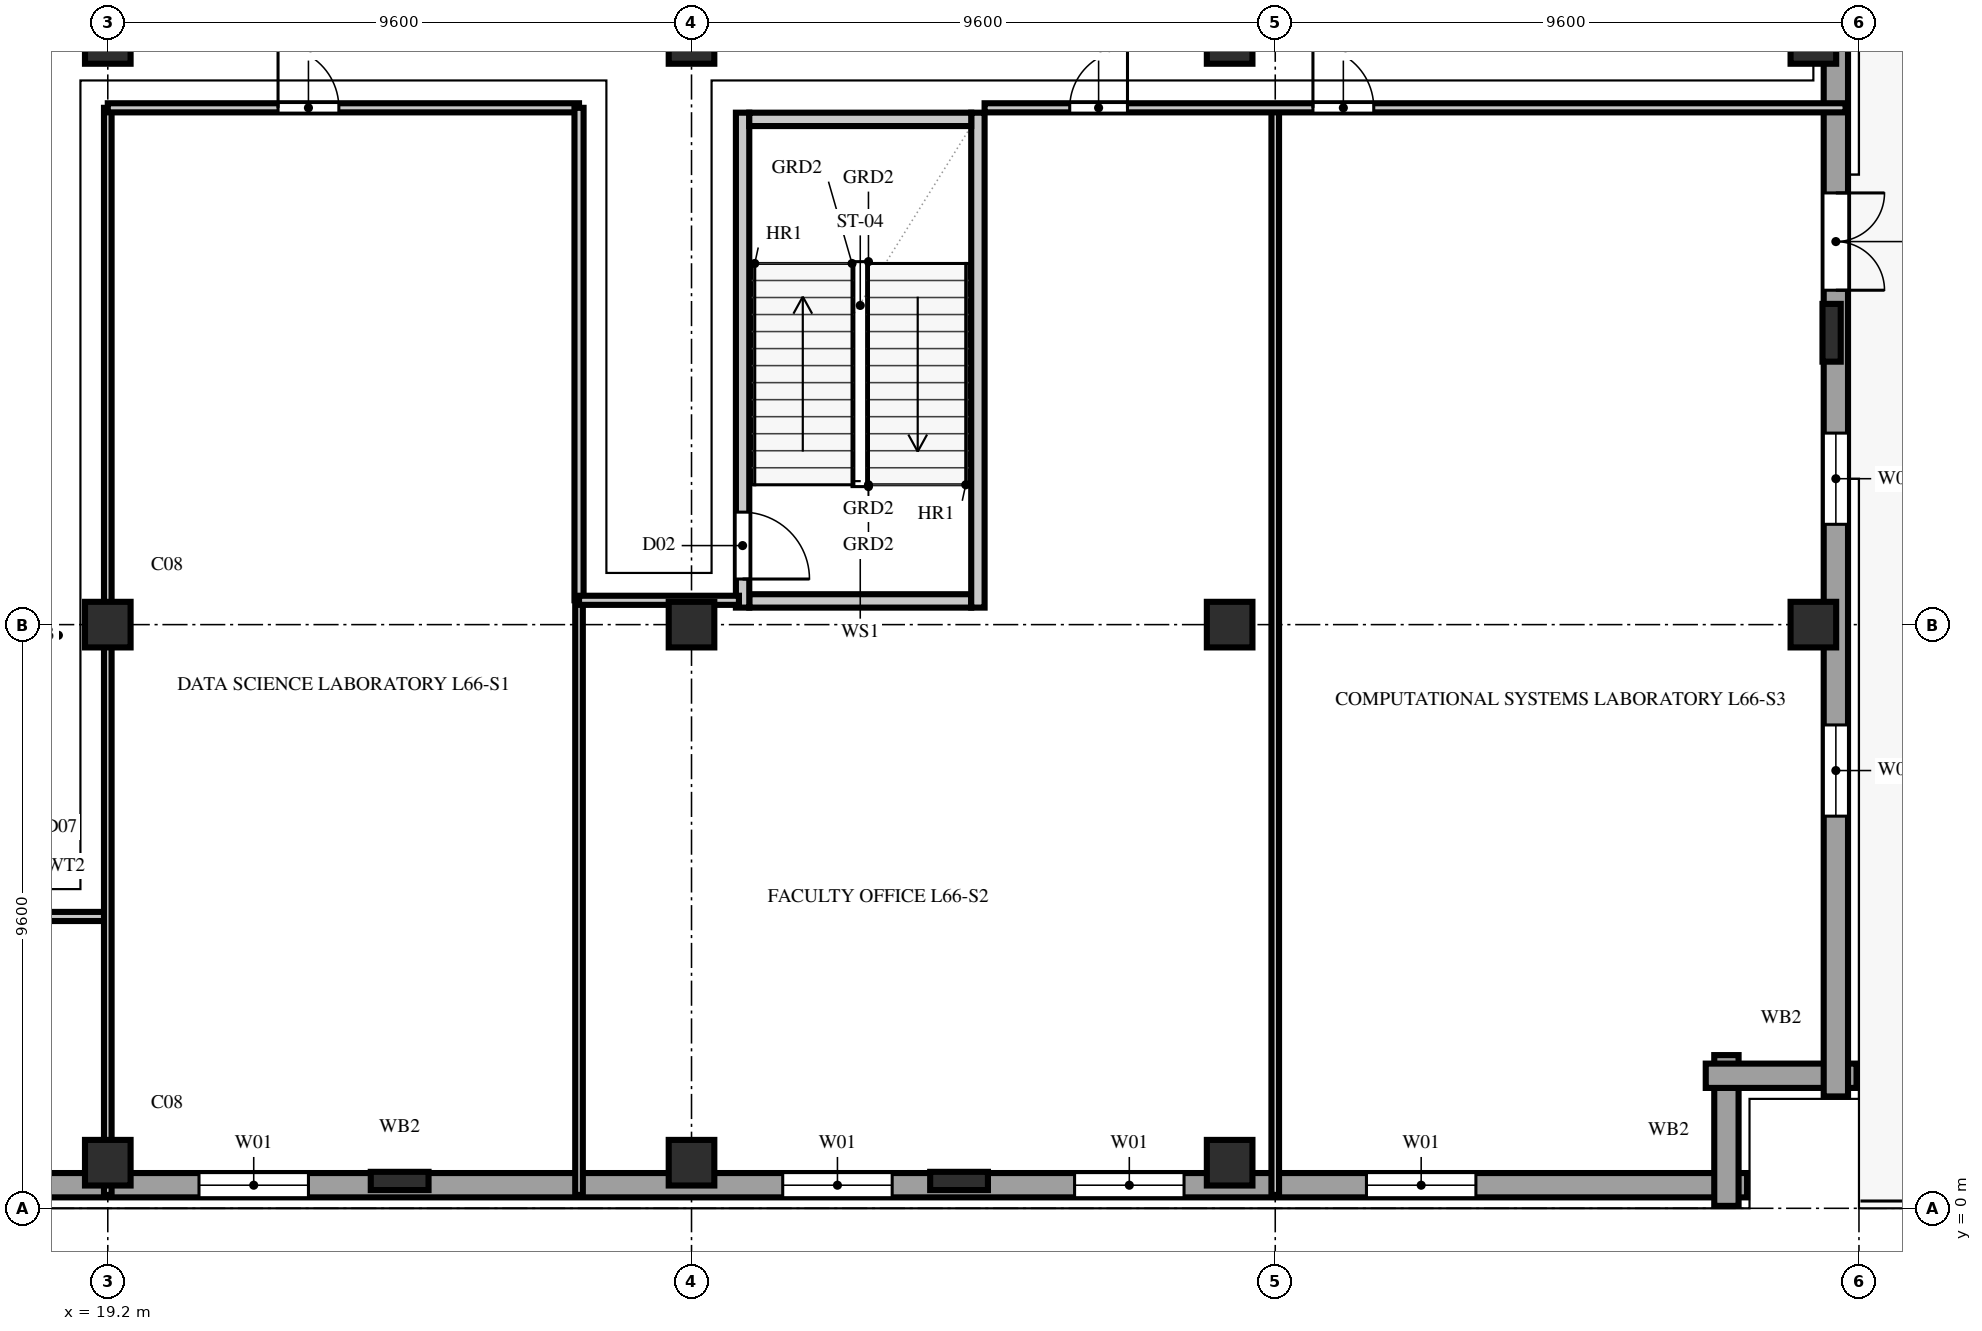
"""IFC4 building model, lengths in metres.
Left out: names, types, materials, properties, quantities, classifications, styles, units other than length and angle.
Written with IfcOpenShell. Run it as: python <this file> out.ifc"""

import sys

from ifc_helpers import new_model, si_unit, direction, frame, frame_2d, origin, origin_2d, place, context, subcontext, project, spatial, rectangle, extrude, element, fill, save


model = new_model("IFC4")
c1 = context("Model", 3, precision=1e-05, world=origin(), true_north=direction((0.0, 1.0)))
c2 = subcontext(c1, "Body", "Model", "MODEL_VIEW")
j1 = project(units=[si_unit("LENGTHUNIT", "METRE"), si_unit("PLANEANGLEUNIT", "RADIAN")], contexts=[c1])
p1 = place(None, origin())
s1 = spatial("IfcSite", under=j1, at=p1, CompositionType="ELEMENT")
p2 = place(p1, origin())
s2 = spatial("IfcBuilding", under=s1, at=p2, CompositionType="ELEMENT")
p3 = place(p2, frame((0.0, 0.0, 261.0)))
s3 = spatial("IfcBuildingStorey", under=s2, at=p3, CompositionType="ELEMENT", Elevation=261.0)
for number, where, z_axis, x_axis in (
    (1, (19.2, 0.75, 0.0), (0.0, 0.0, 1.0), (1.0, 0.0, 0.0)),
    (2, (19.2, 9.6, 0.0), (0.0, 0.0, 1.0), (1.0, 0.0, 0.0)),
    (3, (19.2, 19.2, 0.0), (0.0, 0.0, 1.0), (1.0, 0.0, 0.0)),
    (4, (28.8, 0.75, 0.0), (0.0, 0.0, 1.0), (1.0, 0.0, 0.0)),
    (5, (28.8, 9.6, 0.0), (0.0, 0.0, 1.0), (1.0, 0.0, 0.0)),
    (6, (28.8, 19.2, 0.0), (0.0, 0.0, 1.0), (1.0, 0.0, 0.0)),
    (7, (37.65, 0.75, 0.0), (0.0, 0.0, 1.0), (1.0, 0.0, 0.0)),
    (8, (37.65, 9.6, 0.0), (0.0, 0.0, 1.0), (1.0, 0.0, 0.0)),
    (9, (37.65, 19.2, 0.0), (0.0, 0.0, 1.0), (1.0, 0.0, 0.0)),
    (10, (47.25, 9.6, 0.0), (0.0, 0.0, 1.0), (1.0, 0.0, 0.0)),
    (11, (47.25, 19.2, 0.0), (0.0, 0.0, 1.0), (1.0, 0.0, 0.0)),
):
    element("IfcColumn", number, at=place(p3, frame(where, z_axis=z_axis, x_axis=x_axis)), inside=s3, PredefinedType="COLUMN", context=c2, shape_type="SweptSolid", body=[
        extrude(rectangle(XDim=0.75, YDim=0.75, at=origin_2d()), origin(), (0.0, 0.0, 1.0), 4.8),
    ])
for number, where, z_axis, x_axis in (
    (12, (24.0, 0.45, 0.0), (0.0, 0.0, 1.0), (1.0, 0.0, 0.0)),
    (13, (33.2, 0.45, 0.0), (0.0, 0.0, 1.0), (1.0, 0.0, 0.0)),
    (14, (47.55, 14.4, 0.0), (0.0, 0.0, 1.0), (0.0, 1.0, 0.0)),
):
    element("IfcColumn", number, at=place(p3, frame(where, z_axis=z_axis, x_axis=x_axis)), inside=s3, PredefinedType="PILASTER", context=c2, shape_type="SweptSolid", body=[
        extrude(rectangle(XDim=0.95, YDim=0.3, at=origin_2d()), origin(), (0.0, 0.0, 1.0), 4.8),
    ])
p4 = place(p3, frame((1.84, 0.38, 0.0), z_axis=(0.0, 0.0, 1.0), x_axis=(1.0, 0.0, 0.0)))
e15 = element("IfcWall", 15, at=p4, inside=s3, PredefinedType="SOLIDWALL", context=c2, shape_type="SweptSolid", body=[
    extrude(rectangle(XDim=44.32, YDim=0.4, at=frame_2d((22.16, 0.0))), origin(), (0.0, 0.0, 1.0), 4.54),
])
p5 = place(p4, frame((4.46, 0.0, 0.85)))
e16 = element("IfcOpeningElement", 16, at=p5, cuts=e15, PredefinedType="OPENING", context=c2, shape_type="SweptSolid", body=[
    extrude(rectangle(XDim=1.8, YDim=1.85, at=frame_2d((0.9, 0.925))), frame((0.0, 0.212, 0.0), z_axis=(0.0, -1.0, 0.0), x_axis=(1.0, 0.0, 0.0)), (0.0, 0.0, 1.0), 0.424),
])
p6 = place(p4, frame((9.26, 0.0, 0.85)))
e17 = element("IfcOpeningElement", 17, at=p6, cuts=e15, PredefinedType="OPENING", context=c2, shape_type="SweptSolid", body=[
    extrude(rectangle(XDim=1.8, YDim=1.85, at=frame_2d((0.9, 0.925))), frame((0.0, 0.212, 0.0), z_axis=(0.0, -1.0, 0.0), x_axis=(1.0, 0.0, 0.0)), (0.0, 0.0, 1.0), 0.424),
])
p7 = place(p4, frame((18.86, 0.0, 0.85)))
e18 = element("IfcOpeningElement", 18, at=p7, cuts=e15, PredefinedType="OPENING", context=c2, shape_type="SweptSolid", body=[
    extrude(rectangle(XDim=1.8, YDim=1.85, at=frame_2d((0.9, 0.925))), frame((0.0, 0.212, 0.0), z_axis=(0.0, -1.0, 0.0), x_axis=(1.0, 0.0, 0.0)), (0.0, 0.0, 1.0), 0.424),
])
p8 = place(p4, frame((28.46, 0.0, 0.85)))
e19 = element("IfcOpeningElement", 19, at=p8, cuts=e15, PredefinedType="OPENING", context=c2, shape_type="SweptSolid", body=[
    extrude(rectangle(XDim=1.8, YDim=1.85, at=frame_2d((0.9, 0.925))), frame((0.0, 0.212, 0.0), z_axis=(0.0, -1.0, 0.0), x_axis=(1.0, 0.0, 0.0)), (0.0, 0.0, 1.0), 0.424),
])
p9 = place(p4, frame((33.26, 0.0, 0.85)))
e20 = element("IfcOpeningElement", 20, at=p9, cuts=e15, PredefinedType="OPENING", context=c2, shape_type="SweptSolid", body=[
    extrude(rectangle(XDim=1.8, YDim=1.85, at=frame_2d((0.9, 0.925))), frame((0.0, 0.212, 0.0), z_axis=(0.0, -1.0, 0.0), x_axis=(1.0, 0.0, 0.0)), (0.0, 0.0, 1.0), 0.424),
])
p10 = place(p4, frame((38.06, 0.0, 0.85)))
e21 = element("IfcOpeningElement", 21, at=p10, cuts=e15, PredefinedType="OPENING", context=c2, shape_type="SweptSolid", body=[
    extrude(rectangle(XDim=1.8, YDim=1.85, at=frame_2d((0.9, 0.925))), frame((0.0, 0.212, 0.0), z_axis=(0.0, -1.0, 0.0), x_axis=(1.0, 0.0, 0.0)), (0.0, 0.0, 1.0), 0.424),
])
for number, where, z_axis, x_axis in (
    (22, (45.82, 0.04, 0.0), (0.0, 0.0, 1.0), (0.0, 1.0, 0.0)),
    (23, (45.48, 2.18, 0.0), (0.0, 0.0, 1.0), (1.0, 0.0, 0.0)),
):
    element("IfcWall", number, at=place(p3, frame(where, z_axis=z_axis, x_axis=x_axis)), inside=s3, PredefinedType="SOLIDWALL", context=c2, shape_type="SweptSolid", body=[
        extrude(rectangle(XDim=2.48, YDim=0.4, at=frame_2d((1.24, 0.0))), origin(), (0.0, 0.0, 1.0), 4.54),
    ])
p11 = place(p3, frame((47.62, 1.84, 0.0), z_axis=(0.0, 0.0, 1.0), x_axis=(0.0, 1.0, 0.0)))
e24 = element("IfcWall", 24, at=p11, inside=s3, PredefinedType="SOLIDWALL", context=c2, shape_type="SweptSolid", body=[
    extrude(rectangle(XDim=34.72, YDim=0.4, at=frame_2d((17.36, 0.0))), origin(), (0.0, 0.0, 1.0), 4.54),
])
p12 = place(p11, frame((13.26, 0.0, 0.0)))
e25 = element("IfcOpeningElement", 25, at=p12, cuts=e24, PredefinedType="OPENING", context=c2, shape_type="SweptSolid", body=[
    extrude(rectangle(XDim=1.6, YDim=2.3, at=frame_2d((0.8, 1.15))), frame((0.0, 0.212, 0.0), z_axis=(0.0, -1.0, 0.0), x_axis=(1.0, 0.0, 0.0)), (0.0, 0.0, 1.0), 0.424),
])
p13 = place(p11, frame((4.61, 0.0, 0.85)))
e26 = element("IfcOpeningElement", 26, at=p13, cuts=e24, PredefinedType="OPENING", context=c2, shape_type="SweptSolid", body=[
    extrude(rectangle(XDim=1.5, YDim=1.85, at=frame_2d((0.75, 0.925))), frame((0.0, 0.212, 0.0), z_axis=(0.0, -1.0, 0.0), x_axis=(1.0, 0.0, 0.0)), (0.0, 0.0, 1.0), 0.424),
])
p14 = place(p11, frame((9.41, 0.0, 0.85)))
e27 = element("IfcOpeningElement", 27, at=p14, cuts=e24, PredefinedType="OPENING", context=c2, shape_type="SweptSolid", body=[
    extrude(rectangle(XDim=1.5, YDim=1.85, at=frame_2d((0.75, 0.925))), frame((0.0, 0.212, 0.0), z_axis=(0.0, -1.0, 0.0), x_axis=(1.0, 0.0, 0.0)), (0.0, 0.0, 1.0), 0.424),
])
p15 = place(p11, frame((23.81, 0.0, 0.85)))
e28 = element("IfcOpeningElement", 28, at=p15, cuts=e24, PredefinedType="OPENING", context=c2, shape_type="SweptSolid", body=[
    extrude(rectangle(XDim=1.5, YDim=1.85, at=frame_2d((0.75, 0.925))), frame((0.0, 0.212, 0.0), z_axis=(0.0, -1.0, 0.0), x_axis=(1.0, 0.0, 0.0)), (0.0, 0.0, 1.0), 0.424),
])
p16 = place(p11, frame((28.61, 0.0, 0.85)))
e29 = element("IfcOpeningElement", 29, at=p16, cuts=e24, PredefinedType="OPENING", context=c2, shape_type="SweptSolid", body=[
    extrude(rectangle(XDim=1.5, YDim=1.85, at=frame_2d((0.75, 0.925))), frame((0.0, 0.212, 0.0), z_axis=(0.0, -1.0, 0.0), x_axis=(1.0, 0.0, 0.0)), (0.0, 0.0, 1.0), 0.424),
])
p17 = place(p3, frame((29.75, 9.99, 0.0), z_axis=(0.0, 0.0, 1.0), x_axis=(1.0, 0.0, 0.0)))
e30 = element("IfcWall", 30, at=p17, inside=s3, PredefinedType="SOLIDWALL", context=c2, shape_type="SweptSolid", body=[
    extrude(rectangle(XDim=3.65, YDim=0.22, at=frame_2d((1.825, 0.0))), origin(), (0.0, 0.0, 1.0), 4.54),
])
p18 = place(p3, frame((29.64, 9.88, 0.0), z_axis=(0.0, 0.0, 1.0), x_axis=(0.0, 1.0, 0.0)))
e31 = element("IfcWall", 31, at=p18, inside=s3, PredefinedType="SOLIDWALL", context=c2, shape_type="SweptSolid", body=[
    extrude(rectangle(XDim=8.14, YDim=0.22, at=frame_2d((4.07, 0.0))), origin(), (0.0, 0.0, 1.0), 4.54),
])
p19 = place(p18, frame((0.47, 0.0, 0.0)))
e32 = element("IfcOpeningElement", 32, at=p19, cuts=e31, PredefinedType="OPENING", context=c2, shape_type="SweptSolid", body=[
    extrude(rectangle(XDim=1.1, YDim=2.2, at=frame_2d((0.55, 1.1))), frame((0.0, 0.122, 0.0), z_axis=(0.0, -1.0, 0.0), x_axis=(1.0, 0.0, 0.0)), (0.0, 0.0, 1.0), 0.244),
])
p20 = place(p3, frame((33.51, 9.88, 0.0), z_axis=(0.0, 0.0, 1.0), x_axis=(0.0, 1.0, 0.0)))
e33 = element("IfcWall", 33, at=p20, inside=s3, PredefinedType="SOLIDWALL", context=c2, shape_type="SweptSolid", body=[
    extrude(rectangle(XDim=8.14, YDim=0.22, at=frame_2d((4.07, 0.0))), origin(), (0.0, 0.0, 1.0), 4.54),
])
p21 = place(p3, frame((29.75, 17.91, 0.0), z_axis=(0.0, 0.0, 1.0), x_axis=(1.0, 0.0, 0.0)))
e34 = element("IfcWall", 34, at=p21, inside=s3, PredefinedType="SOLIDWALL", context=c2, shape_type="SweptSolid", body=[
    extrude(rectangle(XDim=3.65, YDim=0.22, at=frame_2d((1.825, 0.0))), origin(), (0.0, 0.0, 1.0), 4.54),
])
p22 = place(p3, frame((17.05, 4.8, 0.0), z_axis=(0.0, 0.0, 1.0), x_axis=(1.0, 0.0, 0.0)))
e35 = element("IfcWall", 35, at=p22, inside=s3, PredefinedType="PARTITIONING", context=c2, shape_type="SweptSolid", body=[
    extrude(rectangle(XDim=2.15, YDim=0.15, at=frame_2d((1.075, 0.0))), origin(), (0.0, 0.0, 1.0), 4.54),
])
p23 = place(p3, frame((19.2, 0.22, 0.0), z_axis=(0.0, 0.0, 1.0), x_axis=(0.0, 1.0, 0.0)))
e36 = element("IfcWall", 36, at=p23, inside=s3, PredefinedType="PARTITIONING", context=c2, shape_type="SweptSolid", body=[
    extrude(rectangle(XDim=0.53, YDim=0.125, at=frame_2d((0.265, 0.0))), origin(), (0.0, 0.0, 1.0), 4.54),
])
p24 = place(p3, frame((19.2, 0.75, 0.0), z_axis=(0.0, 0.0, 1.0), x_axis=(0.0, 1.0, 0.0)))
e37 = element("IfcWall", 37, at=p24, inside=s3, PredefinedType="PARTITIONING", context=c2, shape_type="SweptSolid", body=[
    extrude(rectangle(XDim=17.35, YDim=0.125, at=frame_2d((8.675, 0.0))), origin(), (0.0, 0.0, 1.0), 3.628),
])
p25 = place(p3, frame((19.2, 18.1, 0.0), z_axis=(0.0, 0.0, 1.0), x_axis=(1.0, 0.0, 0.0)))
e38 = element("IfcWall", 38, at=p25, inside=s3, PredefinedType="PARTITIONING", context=c2, shape_type="SweptSolid", body=[
    extrude(rectangle(XDim=7.75, YDim=0.15, at=frame_2d((3.875, 0.0))), origin(), (0.0, 0.0, 1.0), 4.54),
])
p26 = place(p25, frame((2.8, 0.0, 0.0)))
e39 = element("IfcOpeningElement", 39, at=p26, cuts=e38, PredefinedType="OPENING", context=c2, shape_type="SweptSolid", body=[
    extrude(rectangle(XDim=1.0, YDim=2.2, at=frame_2d((0.5, 1.1))), frame((0.0, 0.087, 0.0), z_axis=(0.0, -1.0, 0.0), x_axis=(1.0, 0.0, 0.0)), (0.0, 0.0, 1.0), 0.174),
])
p27 = place(p3, frame((26.95, 0.22, 0.0), z_axis=(0.0, 0.0, 1.0), x_axis=(0.0, 1.0, 0.0)))
e40 = element("IfcWall", 40, at=p27, inside=s3, PredefinedType="PARTITIONING", context=c2, shape_type="SweptSolid", body=[
    extrude(rectangle(XDim=9.78, YDim=0.125, at=frame_2d((4.89, 0.0))), origin(), (0.0, 0.0, 1.0), 4.54),
])
p28 = place(p3, frame((26.95, 10.0, 0.0), z_axis=(0.0, 0.0, 1.0), x_axis=(0.0, 1.0, 0.0)))
e41 = element("IfcWall", 41, at=p28, inside=s3, PredefinedType="PARTITIONING", context=c2, shape_type="SweptSolid", body=[
    extrude(rectangle(XDim=8.1, YDim=0.15, at=frame_2d((4.05, 0.0))), origin(), (0.0, 0.0, 1.0), 4.54),
])
p29 = place(p3, frame((26.95, 10.0, 0.0), z_axis=(0.0, 0.0, 1.0), x_axis=(1.0, 0.0, 0.0)))
e42 = element("IfcWall", 42, at=p29, inside=s3, PredefinedType="PARTITIONING", context=c2, shape_type="SweptSolid", body=[
    extrude(rectangle(XDim=2.63, YDim=0.15, at=frame_2d((1.315, 0.0))), origin(), (0.0, 0.0, 1.0), 4.54),
])
p30 = place(p3, frame((38.4, 0.22, 0.0), z_axis=(0.0, 0.0, 1.0), x_axis=(0.0, 1.0, 0.0)))
e43 = element("IfcWall", 43, at=p30, inside=s3, PredefinedType="PARTITIONING", context=c2, shape_type="SweptSolid", body=[
    extrude(rectangle(XDim=17.88, YDim=0.125, at=frame_2d((8.94, 0.0))), origin(), (0.0, 0.0, 1.0), 4.54),
])
p31 = place(p3, frame((33.62, 18.1, 0.0), z_axis=(0.0, 0.0, 1.0), x_axis=(1.0, 0.0, 0.0)))
e44 = element("IfcWall", 44, at=p31, inside=s3, PredefinedType="PARTITIONING", context=c2, shape_type="SweptSolid", body=[
    extrude(rectangle(XDim=14.16, YDim=0.15, at=frame_2d((7.08, 0.0))), origin(), (0.0, 0.0, 1.0), 4.54),
])
p32 = place(p31, frame((1.4, 0.0, 0.0)))
e45 = element("IfcOpeningElement", 45, at=p32, cuts=e44, PredefinedType="OPENING", context=c2, shape_type="SweptSolid", body=[
    extrude(rectangle(XDim=0.95, YDim=2.15, at=frame_2d((0.475, 1.075))), frame((0.0, 0.087, 0.0), z_axis=(0.0, -1.0, 0.0), x_axis=(1.0, 0.0, 0.0)), (0.0, 0.0, 1.0), 0.174),
])
p33 = place(p31, frame((5.4, 0.0, 0.0)))
e46 = element("IfcOpeningElement", 46, at=p33, cuts=e44, PredefinedType="OPENING", context=c2, shape_type="SweptSolid", body=[
    extrude(rectangle(XDim=1.0, YDim=2.2, at=frame_2d((0.5, 1.1))), frame((0.0, 0.087, 0.0), z_axis=(0.0, -1.0, 0.0), x_axis=(1.0, 0.0, 0.0)), (0.0, 0.0, 1.0), 0.174),
])
p34 = place(p7, origin())
e47 = element("IfcWindow", 47, at=p34, inside=s3, PartitioningType="DOUBLE_PANEL_VERTICAL", PredefinedType="WINDOW", context=c2, shape_type="SweptSolid", body=[
    extrude(rectangle(XDim=1.8, YDim=1.85, at=frame_2d((0.9, 0.925))), frame((0.0, 0.11, 0.0), z_axis=(0.0, -1.0, 0.0), x_axis=(1.0, 0.0, 0.0)), (0.0, 0.0, 1.0), 0.06),
])
fill(e18, e47)
p35 = place(p8, origin())
e48 = element("IfcWindow", 48, at=p35, inside=s3, PartitioningType="DOUBLE_PANEL_VERTICAL", PredefinedType="WINDOW", context=c2, shape_type="SweptSolid", body=[
    extrude(rectangle(XDim=1.8, YDim=1.85, at=frame_2d((0.9, 0.925))), frame((0.0, 0.11, 0.0), z_axis=(0.0, -1.0, 0.0), x_axis=(1.0, 0.0, 0.0)), (0.0, 0.0, 1.0), 0.06),
])
fill(e19, e48)
p36 = place(p9, origin())
e49 = element("IfcWindow", 49, at=p36, inside=s3, PartitioningType="DOUBLE_PANEL_VERTICAL", PredefinedType="WINDOW", context=c2, shape_type="SweptSolid", body=[
    extrude(rectangle(XDim=1.8, YDim=1.85, at=frame_2d((0.9, 0.925))), frame((0.0, 0.11, 0.0), z_axis=(0.0, -1.0, 0.0), x_axis=(1.0, 0.0, 0.0)), (0.0, 0.0, 1.0), 0.06),
])
fill(e20, e49)
p37 = place(p10, origin())
e50 = element("IfcWindow", 50, at=p37, inside=s3, PartitioningType="DOUBLE_PANEL_VERTICAL", PredefinedType="WINDOW", context=c2, shape_type="SweptSolid", body=[
    extrude(rectangle(XDim=1.8, YDim=1.85, at=frame_2d((0.9, 0.925))), frame((0.0, 0.11, 0.0), z_axis=(0.0, -1.0, 0.0), x_axis=(1.0, 0.0, 0.0)), (0.0, 0.0, 1.0), 0.06),
])
fill(e21, e50)
p38 = place(p12, frame((1.6, 0.0, 0.0), z_axis=(0.0, 0.0, 1.0), x_axis=(-1.0, 0.0, 0.0)))
e51 = element("IfcDoor", 51, at=p38, inside=s3, OperationType="DOUBLE_SWING_LEFT", PredefinedType="DOOR", context=c2, shape_type="SweptSolid", body=[
    extrude(rectangle(XDim=1.6, YDim=2.3, at=frame_2d((0.8, 1.15))), frame((0.0, 0.025, 0.0), z_axis=(0.0, -1.0, 0.0), x_axis=(1.0, 0.0, 0.0)), (0.0, 0.0, 1.0), 0.05),
])
fill(e25, e51)
p39 = place(p13, origin())
e52 = element("IfcWindow", 52, at=p39, inside=s3, PartitioningType="DOUBLE_PANEL_VERTICAL", PredefinedType="WINDOW", context=c2, shape_type="SweptSolid", body=[
    extrude(rectangle(XDim=1.5, YDim=1.85, at=frame_2d((0.75, 0.925))), frame((0.0, 0.11, 0.0), z_axis=(0.0, -1.0, 0.0), x_axis=(1.0, 0.0, 0.0)), (0.0, 0.0, 1.0), 0.06),
])
fill(e26, e52)
p40 = place(p14, origin())
e53 = element("IfcWindow", 53, at=p40, inside=s3, PartitioningType="DOUBLE_PANEL_VERTICAL", PredefinedType="WINDOW", context=c2, shape_type="SweptSolid", body=[
    extrude(rectangle(XDim=1.5, YDim=1.85, at=frame_2d((0.75, 0.925))), frame((0.0, 0.11, 0.0), z_axis=(0.0, -1.0, 0.0), x_axis=(1.0, 0.0, 0.0)), (0.0, 0.0, 1.0), 0.06),
])
fill(e27, e53)
p41 = place(p19, frame((1.1, 0.0, 0.0), z_axis=(0.0, 0.0, 1.0), x_axis=(-1.0, 0.0, 0.0)))
e54 = element("IfcDoor", 54, at=p41, inside=s3, OperationType="SINGLE_SWING_RIGHT", PredefinedType="DOOR", context=c2, shape_type="SweptSolid", body=[
    extrude(rectangle(XDim=1.1, YDim=2.2, at=frame_2d((0.55, 1.1))), frame((0.0, 0.025, 0.0), z_axis=(0.0, -1.0, 0.0), x_axis=(1.0, 0.0, 0.0)), (0.0, 0.0, 1.0), 0.05),
])
fill(e32, e54)
p42 = place(p26, origin())
e55 = element("IfcDoor", 55, at=p42, inside=s3, OperationType="SINGLE_SWING_LEFT", PredefinedType="DOOR", context=c2, shape_type="SweptSolid", body=[
    extrude(rectangle(XDim=1.0, YDim=2.2, at=frame_2d((0.5, 1.1))), frame((0.0, 0.025, 0.0), z_axis=(0.0, -1.0, 0.0), x_axis=(1.0, 0.0, 0.0)), (0.0, 0.0, 1.0), 0.05),
])
fill(e39, e55)
p43 = place(p32, origin())
e56 = element("IfcDoor", 56, at=p43, inside=s3, OperationType="SINGLE_SWING_RIGHT", PredefinedType="DOOR", context=c2, shape_type="SweptSolid", body=[
    extrude(rectangle(XDim=0.95, YDim=2.15, at=frame_2d((0.475, 1.075))), frame((0.0, 0.025, 0.0), z_axis=(0.0, -1.0, 0.0), x_axis=(1.0, 0.0, 0.0)), (0.0, 0.0, 1.0), 0.05),
])
fill(e45, e56)
p44 = place(p33, origin())
e57 = element("IfcDoor", 57, at=p44, inside=s3, OperationType="SINGLE_SWING_LEFT", PredefinedType="DOOR", context=c2, shape_type="SweptSolid", body=[
    extrude(rectangle(XDim=1.0, YDim=2.2, at=frame_2d((0.5, 1.1))), frame((0.0, 0.025, 0.0), z_axis=(0.0, -1.0, 0.0), x_axis=(1.0, 0.0, 0.0)), (0.0, 0.0, 1.0), 0.05),
])
fill(e46, e57)
save(model, sys.argv[1])
